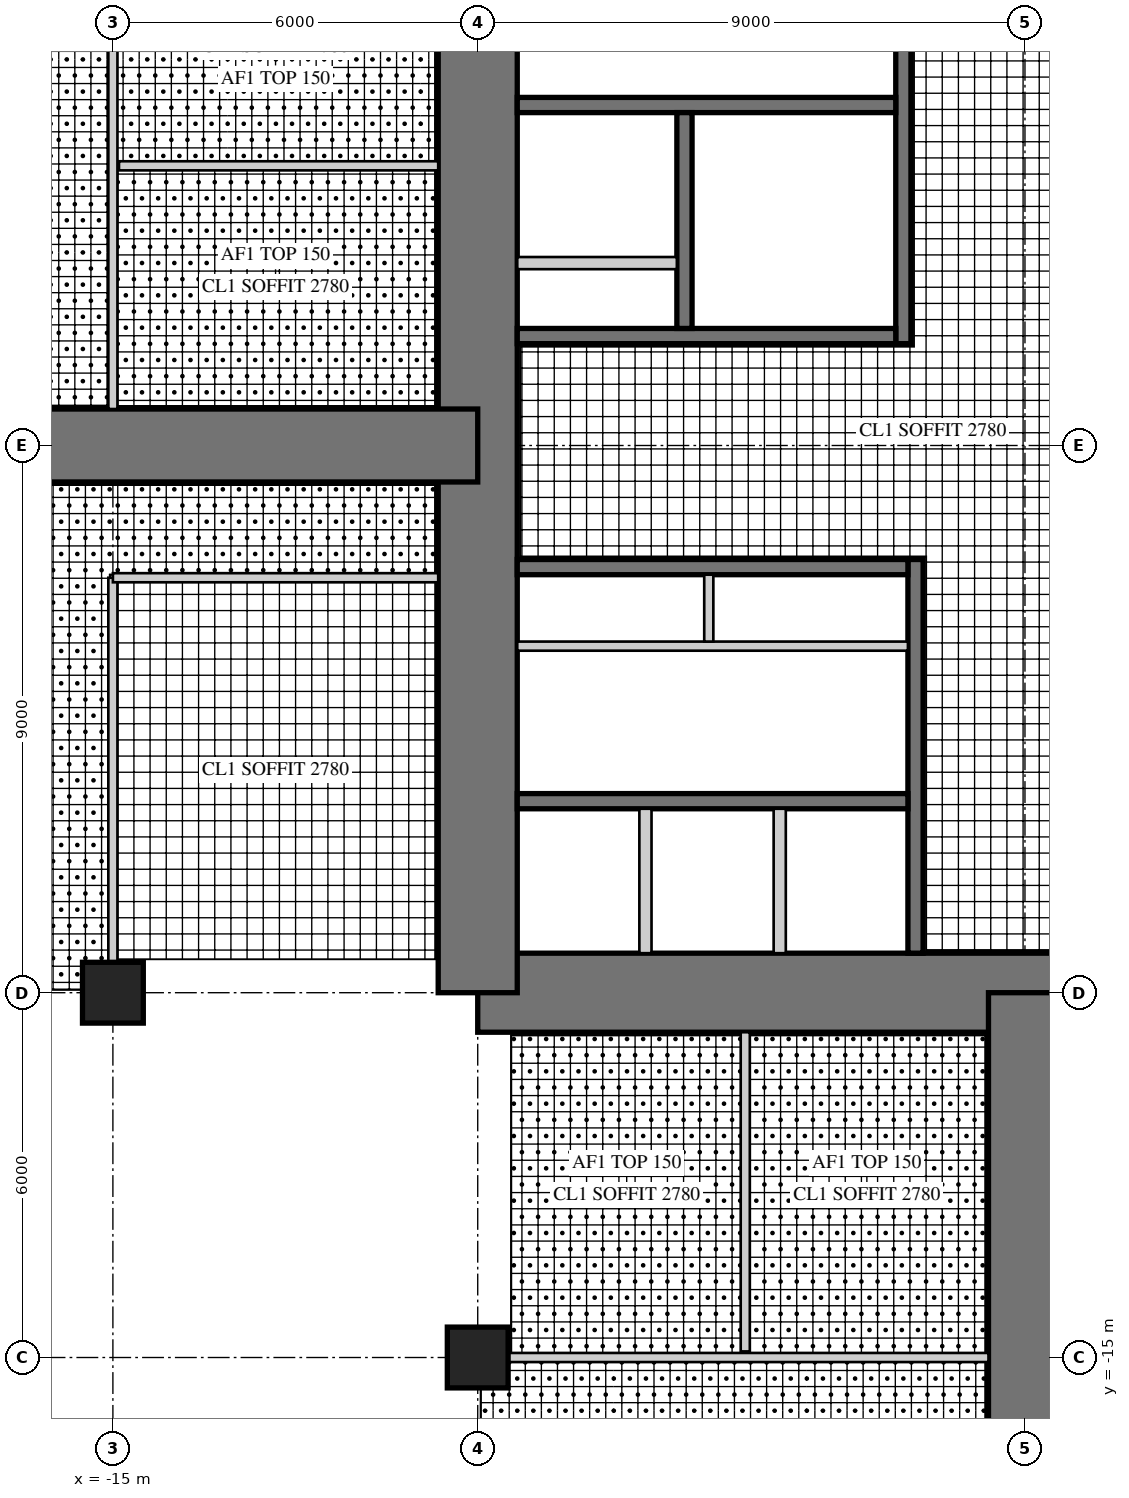
"""IFC4 building model, lengths in metres.
Left out: names, types, materials, properties, quantities, classifications, styles, units other than length and angle.
Written with IfcOpenShell. Run it as: python <this file> out.ifc"""

import sys

from ifc_helpers import new_model, si_unit, direction, frame, frame_2d, origin, origin_2d, place, context, subcontext, project, spatial, rectangle, extrude, element, fill, save


model = new_model("IFC4")
c1 = context("Model", 3, precision=1e-05, world=origin(), true_north=direction((0.0, 1.0)))
c2 = subcontext(c1, "Body", "Model", "MODEL_VIEW")
j1 = project(units=[si_unit("LENGTHUNIT", "METRE"), si_unit("PLANEANGLEUNIT", "RADIAN")], contexts=[c1])
p1 = place(None, origin())
s1 = spatial("IfcSite", under=j1, at=p1, CompositionType="ELEMENT")
p2 = place(p1, origin())
s2 = spatial("IfcBuilding", under=s1, at=p2, CompositionType="ELEMENT")
p3 = place(p2, frame((0.0, 0.0, 116.5)))
s3 = spatial("IfcBuildingStorey", under=s2, at=p3, CompositionType="ELEMENT", Elevation=116.5)
p4 = place(p3, frame((-9.0, -9.0, 0.0), z_axis=(0.0, 0.0, 1.0), x_axis=(1.0, 0.0, 0.0)))
e1 = element("IfcWall", 1, at=p4, inside=s3, PredefinedType="SHEAR", context=c2, shape_type="SweptSolid", body=[
    extrude(rectangle(XDim=18.0, YDim=1.3, at=frame_2d((9.0, 0.0))), origin(), (0.0, 0.0, 1.0), 4.0),
])
p5 = place(p4, frame((9.8, 0.0, 0.0)))
e2 = element("IfcOpeningElement", 2, at=p5, cuts=e1, PredefinedType="OPENING", context=c2, shape_type="SweptSolid", body=[
    extrude(rectangle(XDim=1.0, YDim=2.4, at=frame_2d((0.5, 1.2))), frame((0.0, 0.66, 0.0), z_axis=(0.0, -1.0, 0.0), x_axis=(1.0, 0.0, 0.0)), (0.0, 0.0, 1.0), 1.32),
])
p6 = place(p3, frame((-9.0, 9.0, 0.0), z_axis=(0.0, 0.0, 1.0), x_axis=(0.0, -1.0, 0.0)))
e3 = element("IfcWall", 3, at=p6, inside=s3, PredefinedType="SHEAR", context=c2, shape_type="SweptSolid", body=[
    extrude(rectangle(XDim=18.0, YDim=1.3, at=frame_2d((9.0, 0.0))), origin(), (0.0, 0.0, 1.0), 4.0),
])
p7 = place(p6, frame((9.8, 0.0, 0.0)))
e4 = element("IfcOpeningElement", 4, at=p7, cuts=e3, PredefinedType="OPENING", context=c2, shape_type="SweptSolid", body=[
    extrude(rectangle(XDim=1.0, YDim=2.4, at=frame_2d((0.5, 1.2))), frame((0.0, 0.66, 0.0), z_axis=(0.0, -1.0, 0.0), x_axis=(1.0, 0.0, 0.0)), (0.0, 0.0, 1.0), 1.32),
])
p8 = place(p3, frame((-2.0, 1.675, 0.0), z_axis=(0.0, 0.0, 1.0), x_axis=(0.0, 1.0, 0.0)))
e5 = element("IfcWall", 5, at=p8, inside=s3, PredefinedType="SHEAR", context=c2, shape_type="SweptSolid", body=[
    extrude(rectangle(XDim=6.675, YDim=0.25, at=frame_2d((3.337, 0.0))), origin(), (0.0, 0.0, 1.0), 4.0),
])
p9 = place(p8, frame((0.725, 0.0, 0.0)))
e6 = element("IfcOpeningElement", 6, at=p9, cuts=e5, PredefinedType="OPENING", context=c2, shape_type="SweptSolid", body=[
    extrude(rectangle(XDim=1.0, YDim=2.1, at=frame_2d((0.5, 1.05))), frame((0.0, 0.135, 0.0), z_axis=(0.0, -1.0, 0.0), x_axis=(1.0, 0.0, 0.0)), (0.0, 0.0, 1.0), 0.27),
])
p10 = place(p3, frame((-2.125, 1.8, 0.0), z_axis=(0.0, 0.0, 1.0), x_axis=(-1.0, 0.0, 0.0)))
e7 = element("IfcWall", 7, at=p10, inside=s3, PredefinedType="SHEAR", context=c2, shape_type="SweptSolid", body=[
    extrude(rectangle(XDim=6.225, YDim=0.25, at=frame_2d((3.113, 0.0))), origin(), (0.0, 0.0, 1.0), 4.0),
])
p11 = place(p3, frame((-2.125, 5.6, 0.0), z_axis=(0.0, 0.0, 1.0), x_axis=(-1.0, 0.0, 0.0)))
e8 = element("IfcWall", 8, at=p11, inside=s3, PredefinedType="SHEAR", context=c2, shape_type="SweptSolid", body=[
    extrude(rectangle(XDim=6.225, YDim=0.25, at=frame_2d((3.113, 0.0))), origin(), (0.0, 0.0, 1.0), 4.0),
])
p12 = place(p11, frame((0.175, 0.0, 0.0)))
e9 = element("IfcOpeningElement", 9, at=p12, cuts=e8, PredefinedType="OPENING", context=c2, shape_type="SweptSolid", body=[
    extrude(rectangle(XDim=1.0, YDim=2.1, at=frame_2d((0.5, 1.05))), frame((0.0, 0.135, 0.0), z_axis=(0.0, -1.0, 0.0), x_axis=(1.0, 0.0, 0.0)), (0.0, 0.0, 1.0), 0.27),
])
p13 = place(p3, frame((-5.6, 1.925, 0.0), z_axis=(0.0, 0.0, 1.0), x_axis=(0.0, 1.0, 0.0)))
e10 = element("IfcWall", 10, at=p13, inside=s3, PredefinedType="SHEAR", context=c2, shape_type="SweptSolid", body=[
    extrude(rectangle(XDim=3.55, YDim=0.25, at=frame_2d((1.775, 0.0))), origin(), (0.0, 0.0, 1.0), 4.0),
])
p14 = place(p13, frame((1.525, 0.0, 0.0)))
e11 = element("IfcOpeningElement", 11, at=p14, cuts=e10, PredefinedType="OPENING", context=c2, shape_type="SweptSolid", body=[
    extrude(rectangle(XDim=1.1, YDim=2.2, at=frame_2d((0.55, 1.1))), frame((0.0, 0.135, 0.0), z_axis=(0.0, -1.0, 0.0), x_axis=(1.0, 0.0, 0.0)), (0.0, 0.0, 1.0), 0.27),
])
p15 = place(p13, frame((0.075, 0.0, 0.0)))
e12 = element("IfcOpeningElement", 12, at=p15, cuts=e10, PredefinedType="OPENING", context=c2, shape_type="SweptSolid", body=[
    extrude(rectangle(XDim=0.8, YDim=2.1, at=frame_2d((0.4, 1.05))), frame((0.0, 0.135, 0.0), z_axis=(0.0, -1.0, 0.0), x_axis=(1.0, 0.0, 0.0)), (0.0, 0.0, 1.0), 0.27),
])
p16 = place(p3, frame((-5.725, 3.0, 0.0), z_axis=(0.0, 0.0, 1.0), x_axis=(-1.0, 0.0, 0.0)))
e13 = element("IfcWall", 13, at=p16, inside=s3, PredefinedType="PARTITIONING", context=c2, shape_type="SweptSolid", body=[
    extrude(rectangle(XDim=2.625, YDim=0.2, at=frame_2d((1.312, 0.0))), origin(), (0.0, 0.0, 1.0), 4.0),
])
p17 = place(p3, frame((-1.8, -1.875, 0.0), z_axis=(0.0, 0.0, 1.0), x_axis=(0.0, -1.0, 0.0)))
e14 = element("IfcWall", 14, at=p17, inside=s3, PredefinedType="SHEAR", context=c2, shape_type="SweptSolid", body=[
    extrude(rectangle(XDim=6.475, YDim=0.25, at=frame_2d((3.238, 0.0))), origin(), (0.0, 0.0, 1.0), 4.0),
])
p18 = place(p17, frame((1.875, 0.0, 0.0)))
e15 = element("IfcOpeningElement", 15, at=p18, cuts=e14, PredefinedType="OPENING", context=c2, shape_type="SweptSolid", body=[
    extrude(rectangle(XDim=1.6, YDim=2.4, at=frame_2d((0.8, 1.2))), frame((0.0, 0.135, 0.0), z_axis=(0.0, -1.0, 0.0), x_axis=(1.0, 0.0, 0.0)), (0.0, 0.0, 1.0), 0.27),
])
for number, where, z_axis, x_axis in (
    (16, (-1.925, -2.0, 0.0), (0.0, 0.0, 1.0), (-1.0, 0.0, 0.0)),
    (17, (-1.925, -5.85, 0.0), (0.0, 0.0, 1.0), (-1.0, 0.0, 0.0)),
):
    element("IfcWall", number, at=place(p3, frame(where, z_axis=z_axis, x_axis=x_axis)), inside=s3, PredefinedType="SHEAR", context=c2, shape_type="SweptSolid", body=[
        extrude(rectangle(XDim=6.425, YDim=0.25, at=frame_2d((3.212, 0.0))), origin(), (0.0, 0.0, 1.0), 4.0),
    ])
p19 = place(p3, frame((-1.925, -3.3, 0.0), z_axis=(0.0, 0.0, 1.0), x_axis=(-1.0, 0.0, 0.0)))
e18 = element("IfcWall", 18, at=p19, inside=s3, PredefinedType="PARTITIONING", context=c2, shape_type="SweptSolid", body=[
    extrude(rectangle(XDim=6.425, YDim=0.15, at=frame_2d((3.212, 0.0))), origin(), (0.0, 0.0, 1.0), 4.0),
])
p20 = place(p19, frame((0.075, 0.0, 0.0)))
e19 = element("IfcOpeningElement", 19, at=p20, cuts=e18, PredefinedType="OPENING", context=c2, shape_type="SweptSolid", body=[
    extrude(rectangle(XDim=0.8, YDim=2.1, at=frame_2d((0.4, 1.05))), frame((0.0, 0.085, 0.0), z_axis=(0.0, -1.0, 0.0), x_axis=(1.0, 0.0, 0.0)), (0.0, 0.0, 1.0), 0.17),
])
p21 = place(p19, frame((3.675, 0.0, 0.0)))
e20 = element("IfcOpeningElement", 20, at=p21, cuts=e18, PredefinedType="OPENING", context=c2, shape_type="SweptSolid", body=[
    extrude(rectangle(XDim=0.8, YDim=2.1, at=frame_2d((0.4, 1.05))), frame((0.0, 0.085, 0.0), z_axis=(0.0, -1.0, 0.0), x_axis=(1.0, 0.0, 0.0)), (0.0, 0.0, 1.0), 0.17),
])
p22 = place(p3, frame((-5.2, -2.125, 0.0), z_axis=(0.0, 0.0, 1.0), x_axis=(0.0, -1.0, 0.0)))
e21 = element("IfcWall", 21, at=p22, inside=s3, PredefinedType="PARTITIONING", context=c2, shape_type="SweptSolid", body=[
    extrude(rectangle(XDim=1.1, YDim=0.15, at=frame_2d((0.55, 0.0))), origin(), (0.0, 0.0, 1.0), 4.0),
])
for number, where, z_axis, x_axis in (
    (22, (-4.033, -5.975, 0.0), (0.0, 0.0, 1.0), (0.0, -1.0, 0.0)),
    (23, (-6.242, -5.975, 0.0), (0.0, 0.0, 1.0), (0.0, -1.0, 0.0)),
):
    element("IfcWall", number, at=place(p3, frame(where, z_axis=z_axis, x_axis=x_axis)), inside=s3, PredefinedType="PARTITIONING", context=c2, shape_type="SweptSolid", body=[
        extrude(rectangle(XDim=2.375, YDim=0.2, at=frame_2d((1.188, 0.0))), origin(), (0.0, 0.0, 1.0), 4.0),
    ])
p23 = place(p3, frame((0.0, -9.0, 0.0), z_axis=(0.0, 0.0, 1.0), x_axis=(0.0, -1.0, 0.0)))
e24 = element("IfcWall", 24, at=p23, inside=s3, PredefinedType="SHEAR", context=c2, shape_type="SweptSolid", body=[
    extrude(rectangle(XDim=18.0, YDim=1.2, at=frame_2d((9.0, 0.0))), origin(), (0.0, 0.0, 1.0), 4.0),
])
p24 = place(p23, frame((9.8, 0.0, 0.0)))
e25 = element("IfcOpeningElement", 25, at=p24, cuts=e24, PredefinedType="OPENING", context=c2, shape_type="SweptSolid", body=[
    extrude(rectangle(XDim=1.0, YDim=2.2, at=frame_2d((0.5, 1.1))), frame((0.0, 0.61, 0.0), z_axis=(0.0, -1.0, 0.0), x_axis=(1.0, 0.0, 0.0)), (0.0, 0.0, 1.0), 1.22),
])
p25 = place(p3, frame((-9.0, 0.0, 0.0), z_axis=(0.0, 0.0, 1.0), x_axis=(-1.0, 0.0, 0.0)))
e26 = element("IfcWall", 26, at=p25, inside=s3, PredefinedType="SHEAR", context=c2, shape_type="SweptSolid", body=[
    extrude(rectangle(XDim=18.0, YDim=1.2, at=frame_2d((9.0, 0.0))), origin(), (0.0, 0.0, 1.0), 4.0),
])
p26 = place(p25, frame((9.8, 0.0, 0.0)))
e27 = element("IfcOpeningElement", 27, at=p26, cuts=e26, PredefinedType="OPENING", context=c2, shape_type="SweptSolid", body=[
    extrude(rectangle(XDim=1.0, YDim=2.2, at=frame_2d((0.5, 1.1))), frame((0.0, 0.61, 0.0), z_axis=(0.0, -1.0, 0.0), x_axis=(1.0, 0.0, 0.0)), (0.0, 0.0, 1.0), 1.22),
])
for number, where, z_axis, x_axis in (
    (28, (-9.0, -15.0, 0.0), (0.0, 0.0, 1.0), (1.0, 0.0, 0.0)),
    (29, (-15.0, -9.0, 0.0), (0.0, 0.0, 1.0), (1.0, 0.0, 0.0)),
):
    element("IfcColumn", number, at=place(p3, frame(where, z_axis=z_axis, x_axis=x_axis)), inside=s3, PredefinedType="COLUMN", context=c2, shape_type="SweptSolid", body=[
        extrude(rectangle(XDim=1.0, YDim=1.0, at=origin_2d()), origin(), (0.0, 0.0, 1.0), 4.0),
    ])
p27 = place(p3, frame((-8.5, -15.0, 0.0), z_axis=(0.0, 0.0, 1.0), x_axis=(1.0, 0.0, 0.0)))
e30 = element("IfcWall", 30, at=p27, inside=s3, PredefinedType="PARTITIONING", context=c2, shape_type="SweptSolid", body=[
    extrude(rectangle(XDim=7.9, YDim=0.15, at=frame_2d((3.95, 0.0))), origin(), (0.0, 0.0, 1.0), 3.0),
])
p28 = place(p27, frame((1.45, 0.0, 0.0)))
e31 = element("IfcOpeningElement", 31, at=p28, cuts=e30, PredefinedType="OPENING", context=c2, shape_type="SweptSolid", body=[
    extrude(rectangle(XDim=1.0, YDim=2.1, at=frame_2d((0.5, 1.05))), frame((0.0, 0.085, 0.0), z_axis=(0.0, -1.0, 0.0), x_axis=(1.0, 0.0, 0.0)), (0.0, 0.0, 1.0), 0.17),
])
p29 = place(p27, frame((5.4, 0.0, 0.0)))
e32 = element("IfcOpeningElement", 32, at=p29, cuts=e30, PredefinedType="OPENING", context=c2, shape_type="SweptSolid", body=[
    extrude(rectangle(XDim=1.0, YDim=2.1, at=frame_2d((0.5, 1.05))), frame((0.0, 0.085, 0.0), z_axis=(0.0, -1.0, 0.0), x_axis=(1.0, 0.0, 0.0)), (0.0, 0.0, 1.0), 0.17),
])
p30 = place(p3, frame((-4.6, -9.65, 0.0), z_axis=(0.0, 0.0, 1.0), x_axis=(0.0, -1.0, 0.0)))
e33 = element("IfcWall", 33, at=p30, inside=s3, PredefinedType="PARTITIONING", context=c2, shape_type="SweptSolid", body=[
    extrude(rectangle(XDim=5.25, YDim=0.15, at=frame_2d((2.625, 0.0))), origin(), (0.0, 0.0, 1.0), 3.8),
])
p31 = place(p3, frame((-15.0, -2.175, 0.0), z_axis=(0.0, 0.0, 1.0), x_axis=(0.0, -1.0, 0.0)))
e34 = element("IfcWall", 34, at=p31, inside=s3, PredefinedType="PARTITIONING", context=c2, shape_type="SweptSolid", body=[
    extrude(rectangle(XDim=6.325, YDim=0.15, at=frame_2d((3.163, 0.0))), origin(), (0.0, 0.0, 1.0), 3.0),
])
p32 = place(p31, frame((2.663, 0.0, 0.0)))
e35 = element("IfcOpeningElement", 35, at=p32, cuts=e34, PredefinedType="OPENING", context=c2, shape_type="SweptSolid", body=[
    extrude(rectangle(XDim=1.0, YDim=2.1, at=frame_2d((0.5, 1.05))), frame((0.0, 0.085, 0.0), z_axis=(0.0, -1.0, 0.0), x_axis=(1.0, 0.0, 0.0)), (0.0, 0.0, 1.0), 0.17),
])
p33 = place(p3, frame((-9.65, -2.175, 0.0), z_axis=(0.0, 0.0, 1.0), x_axis=(-1.0, 0.0, 0.0)))
e36 = element("IfcWall", 36, at=p33, inside=s3, PredefinedType="PARTITIONING", context=c2, shape_type="SweptSolid", body=[
    extrude(rectangle(XDim=5.35, YDim=0.15, at=frame_2d((2.675, 0.0))), origin(), (0.0, 0.0, 1.0), 3.8),
])
p34 = place(p3, frame((-15.0, 8.5, 0.0), z_axis=(0.0, 0.0, 1.0), x_axis=(0.0, -1.0, 0.0)))
e37 = element("IfcWall", 37, at=p34, inside=s3, PredefinedType="PARTITIONING", context=c2, shape_type="SweptSolid", body=[
    extrude(rectangle(XDim=7.9, YDim=0.15, at=frame_2d((3.95, 0.0))), origin(), (0.0, 0.0, 1.0), 3.0),
])
p35 = place(p34, frame((1.45, 0.0, 0.0)))
e38 = element("IfcOpeningElement", 38, at=p35, cuts=e37, PredefinedType="OPENING", context=c2, shape_type="SweptSolid", body=[
    extrude(rectangle(XDim=1.0, YDim=2.1, at=frame_2d((0.5, 1.05))), frame((0.0, 0.085, 0.0), z_axis=(0.0, -1.0, 0.0), x_axis=(1.0, 0.0, 0.0)), (0.0, 0.0, 1.0), 0.17),
])
p36 = place(p34, frame((5.4, 0.0, 0.0)))
e39 = element("IfcOpeningElement", 39, at=p36, cuts=e37, PredefinedType="OPENING", context=c2, shape_type="SweptSolid", body=[
    extrude(rectangle(XDim=1.0, YDim=2.1, at=frame_2d((0.5, 1.05))), frame((0.0, 0.085, 0.0), z_axis=(0.0, -1.0, 0.0), x_axis=(1.0, 0.0, 0.0)), (0.0, 0.0, 1.0), 0.17),
])
p37 = place(p3, frame((-9.65, 4.6, 0.0), z_axis=(0.0, 0.0, 1.0), x_axis=(-1.0, 0.0, 0.0)))
e40 = element("IfcWall", 40, at=p37, inside=s3, PredefinedType="PARTITIONING", context=c2, shape_type="SweptSolid", body=[
    extrude(rectangle(XDim=5.25, YDim=0.15, at=frame_2d((2.625, 0.0))), origin(), (0.0, 0.0, 1.0), 3.8),
])
p38 = place(p28, origin())
e41 = element("IfcDoor", 41, at=p38, inside=s3, OperationType="SINGLE_SWING_RIGHT", PredefinedType="DOOR", context=c2, shape_type="SweptSolid", body=[
    extrude(rectangle(XDim=1.0, YDim=2.1, at=frame_2d((0.5, 1.05))), frame((0.0, 0.025, 0.0), z_axis=(0.0, -1.0, 0.0), x_axis=(1.0, 0.0, 0.0)), (0.0, 0.0, 1.0), 0.05),
])
fill(e31, e41)
p39 = place(p29, origin())
e42 = element("IfcDoor", 42, at=p39, inside=s3, OperationType="SINGLE_SWING_LEFT", PredefinedType="DOOR", context=c2, shape_type="SweptSolid", body=[
    extrude(rectangle(XDim=1.0, YDim=2.1, at=frame_2d((0.5, 1.05))), frame((0.0, 0.025, 0.0), z_axis=(0.0, -1.0, 0.0), x_axis=(1.0, 0.0, 0.0)), (0.0, 0.0, 1.0), 0.05),
])
fill(e32, e42)
p40 = place(p32, origin())
e43 = element("IfcDoor", 43, at=p40, inside=s3, OperationType="SINGLE_SWING_LEFT", PredefinedType="DOOR", context=c2, shape_type="SweptSolid", body=[
    extrude(rectangle(XDim=1.0, YDim=2.1, at=frame_2d((0.5, 1.05))), frame((0.0, 0.025, 0.0), z_axis=(0.0, -1.0, 0.0), x_axis=(1.0, 0.0, 0.0)), (0.0, 0.0, 1.0), 0.05),
])
fill(e35, e43)
p41 = place(p35, origin())
e44 = element("IfcDoor", 44, at=p41, inside=s3, OperationType="SINGLE_SWING_RIGHT", PredefinedType="DOOR", context=c2, shape_type="SweptSolid", body=[
    extrude(rectangle(XDim=1.0, YDim=2.1, at=frame_2d((0.5, 1.05))), frame((0.0, 0.025, 0.0), z_axis=(0.0, -1.0, 0.0), x_axis=(1.0, 0.0, 0.0)), (0.0, 0.0, 1.0), 0.05),
])
fill(e38, e44)
p42 = place(p36, origin())
e45 = element("IfcDoor", 45, at=p42, inside=s3, OperationType="SINGLE_SWING_LEFT", PredefinedType="DOOR", context=c2, shape_type="SweptSolid", body=[
    extrude(rectangle(XDim=1.0, YDim=2.1, at=frame_2d((0.5, 1.05))), frame((0.0, 0.025, 0.0), z_axis=(0.0, -1.0, 0.0), x_axis=(1.0, 0.0, 0.0)), (0.0, 0.0, 1.0), 0.05),
])
fill(e39, e45)
p43 = place(p7, frame((1.0, 0.0, 0.0), z_axis=(0.0, 0.0, 1.0), x_axis=(-1.0, 0.0, 0.0)))
e46 = element("IfcDoor", 46, at=p43, inside=s3, OperationType="SINGLE_SWING_RIGHT", PredefinedType="DOOR", context=c2, shape_type="SweptSolid", body=[
    extrude(rectangle(XDim=1.0, YDim=2.4, at=frame_2d((0.5, 1.2))), frame((0.0, -0.005, 0.0), z_axis=(0.0, -1.0, 0.0), x_axis=(1.0, 0.0, 0.0)), (0.0, 0.0, 1.0), 0.05),
])
fill(e4, e46)
p44 = place(p9, origin())
e47 = element("IfcDoor", 47, at=p44, inside=s3, OperationType="SINGLE_SWING_LEFT", PredefinedType="DOOR", context=c2, shape_type="SweptSolid", body=[
    extrude(rectangle(XDim=1.0, YDim=2.1, at=frame_2d((0.5, 1.05))), frame((0.0, 0.025, 0.0), z_axis=(0.0, -1.0, 0.0), x_axis=(1.0, 0.0, 0.0)), (0.0, 0.0, 1.0), 0.05),
])
fill(e6, e47)
p45 = place(p12, frame((1.0, 0.0, 0.0), z_axis=(0.0, 0.0, 1.0), x_axis=(-1.0, 0.0, 0.0)))
e48 = element("IfcDoor", 48, at=p45, inside=s3, OperationType="SINGLE_SWING_RIGHT", PredefinedType="DOOR", context=c2, shape_type="SweptSolid", body=[
    extrude(rectangle(XDim=1.0, YDim=2.1, at=frame_2d((0.5, 1.05))), frame((0.0, 0.025, 0.0), z_axis=(0.0, -1.0, 0.0), x_axis=(1.0, 0.0, 0.0)), (0.0, 0.0, 1.0), 0.05),
])
fill(e9, e48)
p46 = place(p14, origin())
e49 = element("IfcDoor", 49, at=p46, inside=s3, OperationType="DOUBLE_DOOR_SLIDING", PredefinedType="DOOR", context=c2, shape_type="SweptSolid", body=[
    extrude(rectangle(XDim=1.1, YDim=2.2, at=frame_2d((0.55, 1.1))), frame((0.0, 0.025, 0.0), z_axis=(0.0, -1.0, 0.0), x_axis=(1.0, 0.0, 0.0)), (0.0, 0.0, 1.0), 0.05),
])
fill(e11, e49)
p47 = place(p15, origin())
e50 = element("IfcDoor", 50, at=p47, inside=s3, OperationType="SINGLE_SWING_LEFT", PredefinedType="DOOR", context=c2, shape_type="SweptSolid", body=[
    extrude(rectangle(XDim=0.8, YDim=2.1, at=frame_2d((0.4, 1.05))), frame((0.0, 0.025, 0.0), z_axis=(0.0, -1.0, 0.0), x_axis=(1.0, 0.0, 0.0)), (0.0, 0.0, 1.0), 0.05),
])
fill(e12, e50)
p48 = place(p18, frame((1.6, 0.0, 0.0), z_axis=(0.0, 0.0, 1.0), x_axis=(-1.0, 0.0, 0.0)))
e51 = element("IfcDoor", 51, at=p48, inside=s3, OperationType="DOUBLE_DOOR_SINGLE_SWING", PredefinedType="DOOR", context=c2, shape_type="SweptSolid", body=[
    extrude(rectangle(XDim=1.6, YDim=2.4, at=frame_2d((0.8, 1.2))), frame((0.0, 0.025, 0.0), z_axis=(0.0, -1.0, 0.0), x_axis=(1.0, 0.0, 0.0)), (0.0, 0.0, 1.0), 0.05),
])
fill(e15, e51)
p49 = place(p20, frame((0.8, 0.0, 0.0), z_axis=(0.0, 0.0, 1.0), x_axis=(-1.0, 0.0, 0.0)))
e52 = element("IfcDoor", 52, at=p49, inside=s3, OperationType="SINGLE_SWING_RIGHT", PredefinedType="DOOR", context=c2, shape_type="SweptSolid", body=[
    extrude(rectangle(XDim=0.8, YDim=2.1, at=frame_2d((0.4, 1.05))), frame((0.0, 0.025, 0.0), z_axis=(0.0, -1.0, 0.0), x_axis=(1.0, 0.0, 0.0)), (0.0, 0.0, 1.0), 0.05),
])
fill(e19, e52)
p50 = place(p21, frame((0.8, 0.0, 0.0), z_axis=(0.0, 0.0, 1.0), x_axis=(-1.0, 0.0, 0.0)))
e53 = element("IfcDoor", 53, at=p50, inside=s3, OperationType="SINGLE_SWING_RIGHT", PredefinedType="DOOR", context=c2, shape_type="SweptSolid", body=[
    extrude(rectangle(XDim=0.8, YDim=2.1, at=frame_2d((0.4, 1.05))), frame((0.0, 0.025, 0.0), z_axis=(0.0, -1.0, 0.0), x_axis=(1.0, 0.0, 0.0)), (0.0, 0.0, 1.0), 0.05),
])
fill(e20, e53)
save(model, sys.argv[1])
